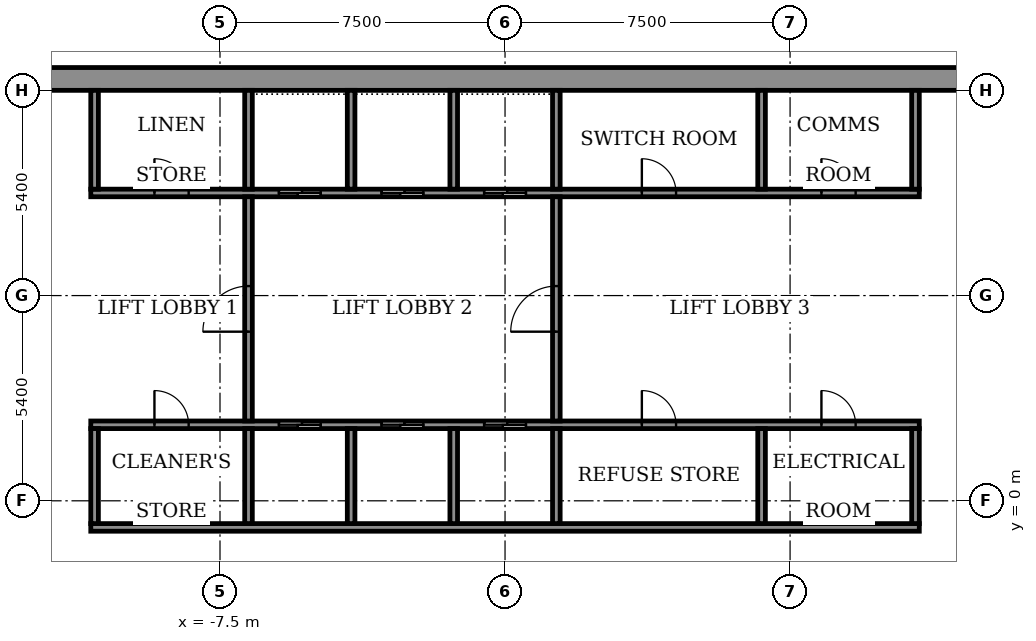
"""IFC4 building model, lengths in metres.
Left out: names, types, materials, properties, quantities, classifications, styles, units other than length and angle.
Written with IfcOpenShell. Run it as: python <this file> out.ifc"""

import sys

from ifc_helpers import new_model, si_unit, direction, frame, frame_2d, origin, place, context, subcontext, project, spatial, rectangle, extrude, element, fill, save


model = new_model("IFC4")
c1 = context("Model", 3, precision=1e-05, world=origin(), true_north=direction((0.0, 1.0)))
c2 = subcontext(c1, "Body", "Model", "MODEL_VIEW")
j1 = project(units=[si_unit("LENGTHUNIT", "METRE"), si_unit("PLANEANGLEUNIT", "RADIAN")], contexts=[c1])
p1 = place(None, origin())
s1 = spatial("IfcSite", under=j1, at=p1, CompositionType="ELEMENT")
p2 = place(p1, origin())
s2 = spatial("IfcBuilding", under=s1, at=p2, CompositionType="ELEMENT")
p3 = place(p2, frame((0.0, 0.0, 313.3)))
s3 = spatial("IfcBuildingStorey", under=s2, at=p3, CompositionType="ELEMENT", Elevation=313.3)
p4 = place(p3, frame((-14.4, 11.1, 0.0), z_axis=(0.0, 0.0, 1.0), x_axis=(1.0, 0.0, 0.0)))
e1 = element("IfcWall", 1, at=p4, inside=s3, PredefinedType="SHEAR", context=c2, shape_type="SweptSolid", body=[
    extrude(rectangle(XDim=28.8, YDim=0.6, at=frame_2d((14.4, 0.0))), origin(), (0.0, 0.0, 1.0), 3.6),
])
p5 = place(p3, frame((-10.9, -0.7, 0.0), z_axis=(0.0, 0.0, 1.0), x_axis=(1.0, 0.0, 0.0)))
e2 = element("IfcWall", 2, at=p5, inside=s3, PredefinedType="SHEAR", context=c2, shape_type="SweptSolid", body=[
    extrude(rectangle(XDim=21.8, YDim=0.2, at=frame_2d((10.9, 0.0))), origin(), (0.0, 0.0, 1.0), 3.05),
])
p6 = place(p3, frame((-10.9, 2.0, 0.0), z_axis=(0.0, 0.0, 1.0), x_axis=(1.0, 0.0, 0.0)))
e3 = element("IfcWall", 3, at=p6, inside=s3, PredefinedType="SHEAR", context=c2, shape_type="SweptSolid", body=[
    extrude(rectangle(XDim=21.8, YDim=0.2, at=frame_2d((10.9, 0.0))), origin(), (0.0, 0.0, 1.0), 3.05),
])
p7 = place(p6, frame((4.95, 0.0, 0.0)))
e4 = element("IfcOpeningElement", 4, at=p7, cuts=e3, PredefinedType="OPENING", context=c2, shape_type="SweptSolid", body=[
    extrude(rectangle(XDim=1.1, YDim=2.1, at=frame_2d((0.55, 1.05))), frame((0.0, 0.11, 0.0), z_axis=(0.0, -1.0, 0.0), x_axis=(1.0, 0.0, 0.0)), (0.0, 0.0, 1.0), 0.22),
])
p8 = place(p6, frame((7.65, 0.0, 0.0)))
e5 = element("IfcOpeningElement", 5, at=p8, cuts=e3, PredefinedType="OPENING", context=c2, shape_type="SweptSolid", body=[
    extrude(rectangle(XDim=1.1, YDim=2.1, at=frame_2d((0.55, 1.05))), frame((0.0, 0.11, 0.0), z_axis=(0.0, -1.0, 0.0), x_axis=(1.0, 0.0, 0.0)), (0.0, 0.0, 1.0), 0.22),
])
p9 = place(p6, frame((10.35, 0.0, 0.0)))
e6 = element("IfcOpeningElement", 6, at=p9, cuts=e3, PredefinedType="OPENING", context=c2, shape_type="SweptSolid", body=[
    extrude(rectangle(XDim=1.1, YDim=2.1, at=frame_2d((0.55, 1.05))), frame((0.0, 0.11, 0.0), z_axis=(0.0, -1.0, 0.0), x_axis=(1.0, 0.0, 0.0)), (0.0, 0.0, 1.0), 0.22),
])
p10 = place(p6, frame((1.675, 0.0, 0.0)))
e7 = element("IfcOpeningElement", 7, at=p10, cuts=e3, PredefinedType="OPENING", context=c2, shape_type="SweptSolid", body=[
    extrude(rectangle(XDim=0.9, YDim=2.1, at=frame_2d((0.45, 1.05))), frame((0.0, 0.11, 0.0), z_axis=(0.0, -1.0, 0.0), x_axis=(1.0, 0.0, 0.0)), (0.0, 0.0, 1.0), 0.22),
])
p11 = place(p6, frame((14.5, 0.0, 0.0)))
e8 = element("IfcOpeningElement", 8, at=p11, cuts=e3, PredefinedType="OPENING", context=c2, shape_type="SweptSolid", body=[
    extrude(rectangle(XDim=0.9, YDim=2.1, at=frame_2d((0.45, 1.05))), frame((0.0, 0.11, 0.0), z_axis=(0.0, -1.0, 0.0), x_axis=(1.0, 0.0, 0.0)), (0.0, 0.0, 1.0), 0.22),
])
p12 = place(p6, frame((19.225, 0.0, 0.0)))
e9 = element("IfcOpeningElement", 9, at=p12, cuts=e3, PredefinedType="OPENING", context=c2, shape_type="SweptSolid", body=[
    extrude(rectangle(XDim=0.9, YDim=2.1, at=frame_2d((0.45, 1.05))), frame((0.0, 0.11, 0.0), z_axis=(0.0, -1.0, 0.0), x_axis=(1.0, 0.0, 0.0)), (0.0, 0.0, 1.0), 0.22),
])
p13 = place(p3, frame((-10.9, 8.1, 0.0), z_axis=(0.0, 0.0, 1.0), x_axis=(1.0, 0.0, 0.0)))
e10 = element("IfcWall", 10, at=p13, inside=s3, PredefinedType="SHEAR", context=c2, shape_type="SweptSolid", body=[
    extrude(rectangle(XDim=21.8, YDim=0.2, at=frame_2d((10.9, 0.0))), origin(), (0.0, 0.0, 1.0), 3.05),
])
p14 = place(p13, frame((4.95, 0.0, 0.0)))
e11 = element("IfcOpeningElement", 11, at=p14, cuts=e10, PredefinedType="OPENING", context=c2, shape_type="SweptSolid", body=[
    extrude(rectangle(XDim=1.1, YDim=2.1, at=frame_2d((0.55, 1.05))), frame((0.0, 0.11, 0.0), z_axis=(0.0, -1.0, 0.0), x_axis=(1.0, 0.0, 0.0)), (0.0, 0.0, 1.0), 0.22),
])
p15 = place(p13, frame((7.65, 0.0, 0.0)))
e12 = element("IfcOpeningElement", 12, at=p15, cuts=e10, PredefinedType="OPENING", context=c2, shape_type="SweptSolid", body=[
    extrude(rectangle(XDim=1.1, YDim=2.1, at=frame_2d((0.55, 1.05))), frame((0.0, 0.11, 0.0), z_axis=(0.0, -1.0, 0.0), x_axis=(1.0, 0.0, 0.0)), (0.0, 0.0, 1.0), 0.22),
])
p16 = place(p13, frame((10.35, 0.0, 0.0)))
e13 = element("IfcOpeningElement", 13, at=p16, cuts=e10, PredefinedType="OPENING", context=c2, shape_type="SweptSolid", body=[
    extrude(rectangle(XDim=1.1, YDim=2.1, at=frame_2d((0.55, 1.05))), frame((0.0, 0.11, 0.0), z_axis=(0.0, -1.0, 0.0), x_axis=(1.0, 0.0, 0.0)), (0.0, 0.0, 1.0), 0.22),
])
p17 = place(p13, frame((1.675, 0.0, 0.0)))
e14 = element("IfcOpeningElement", 14, at=p17, cuts=e10, PredefinedType="OPENING", context=c2, shape_type="SweptSolid", body=[
    extrude(rectangle(XDim=0.9, YDim=2.1, at=frame_2d((0.45, 1.05))), frame((0.0, 0.11, 0.0), z_axis=(0.0, -1.0, 0.0), x_axis=(1.0, 0.0, 0.0)), (0.0, 0.0, 1.0), 0.22),
])
p18 = place(p13, frame((14.5, 0.0, 0.0)))
e15 = element("IfcOpeningElement", 15, at=p18, cuts=e10, PredefinedType="OPENING", context=c2, shape_type="SweptSolid", body=[
    extrude(rectangle(XDim=0.9, YDim=2.1, at=frame_2d((0.45, 1.05))), frame((0.0, 0.11, 0.0), z_axis=(0.0, -1.0, 0.0), x_axis=(1.0, 0.0, 0.0)), (0.0, 0.0, 1.0), 0.22),
])
p19 = place(p13, frame((19.225, 0.0, 0.0)))
e16 = element("IfcOpeningElement", 16, at=p19, cuts=e10, PredefinedType="OPENING", context=c2, shape_type="SweptSolid", body=[
    extrude(rectangle(XDim=0.9, YDim=2.1, at=frame_2d((0.45, 1.05))), frame((0.0, 0.11, 0.0), z_axis=(0.0, -1.0, 0.0), x_axis=(1.0, 0.0, 0.0)), (0.0, 0.0, 1.0), 0.22),
])
p20 = place(p3, frame((-10.8, -0.6, 0.0), z_axis=(0.0, 0.0, 1.0), x_axis=(0.0, 1.0, 0.0)))
e17 = element("IfcWall", 17, at=p20, inside=s3, PredefinedType="STANDARD", context=c2, shape_type="SweptSolid", body=[
    extrude(rectangle(XDim=2.5, YDim=0.2, at=frame_2d((1.25, 0.0))), origin(), (0.0, 0.0, 1.0), 3.05),
])
for number, where, z_axis, x_axis in (
    (18, (-6.75, -0.6, 0.0), (0.0, 0.0, 1.0), (0.0, 1.0, 0.0)),
    (19, (-4.05, -0.6, 0.0), (0.0, 0.0, 1.0), (0.0, 1.0, 0.0)),
    (20, (-1.35, -0.6, 0.0), (0.0, 0.0, 1.0), (0.0, 1.0, 0.0)),
    (21, (1.35, -0.6, 0.0), (0.0, 0.0, 1.0), (0.0, 1.0, 0.0)),
):
    element("IfcWall", number, at=place(p3, frame(where, z_axis=z_axis, x_axis=x_axis)), inside=s3, PredefinedType="SHEAR", context=c2, shape_type="SweptSolid", body=[
        extrude(rectangle(XDim=2.5, YDim=0.2, at=frame_2d((1.25, 0.0))), origin(), (0.0, 0.0, 1.0), 3.05),
    ])
for number, where, z_axis, x_axis in (
    (22, (6.75, -0.6, 0.0), (0.0, 0.0, 1.0), (0.0, 1.0, 0.0)),
    (23, (10.8, -0.6, 0.0), (0.0, 0.0, 1.0), (0.0, 1.0, 0.0)),
):
    element("IfcWall", number, at=place(p3, frame(where, z_axis=z_axis, x_axis=x_axis)), inside=s3, PredefinedType="STANDARD", context=c2, shape_type="SweptSolid", body=[
        extrude(rectangle(XDim=2.5, YDim=0.2, at=frame_2d((1.25, 0.0))), origin(), (0.0, 0.0, 1.0), 3.05),
    ])
p21 = place(p3, frame((-10.8, 8.2, 0.0), z_axis=(0.0, 0.0, 1.0), x_axis=(0.0, 1.0, 0.0)))
e24 = element("IfcWall", 24, at=p21, inside=s3, PredefinedType="STANDARD", context=c2, shape_type="SweptSolid", body=[
    extrude(rectangle(XDim=2.6, YDim=0.2, at=frame_2d((1.3, 0.0))), origin(), (0.0, 0.0, 1.0), 3.05),
])
for number, where, z_axis, x_axis in (
    (25, (-6.75, 8.2, 0.0), (0.0, 0.0, 1.0), (0.0, 1.0, 0.0)),
    (26, (-4.05, 8.2, 0.0), (0.0, 0.0, 1.0), (0.0, 1.0, 0.0)),
    (27, (-1.35, 8.2, 0.0), (0.0, 0.0, 1.0), (0.0, 1.0, 0.0)),
    (28, (1.35, 8.2, 0.0), (0.0, 0.0, 1.0), (0.0, 1.0, 0.0)),
):
    element("IfcWall", number, at=place(p3, frame(where, z_axis=z_axis, x_axis=x_axis)), inside=s3, PredefinedType="SHEAR", context=c2, shape_type="SweptSolid", body=[
        extrude(rectangle(XDim=2.6, YDim=0.2, at=frame_2d((1.3, 0.0))), origin(), (0.0, 0.0, 1.0), 3.05),
    ])
for number, where, z_axis, x_axis in (
    (29, (6.75, 8.2, 0.0), (0.0, 0.0, 1.0), (0.0, 1.0, 0.0)),
    (30, (10.8, 8.2, 0.0), (0.0, 0.0, 1.0), (0.0, 1.0, 0.0)),
):
    element("IfcWall", number, at=place(p3, frame(where, z_axis=z_axis, x_axis=x_axis)), inside=s3, PredefinedType="STANDARD", context=c2, shape_type="SweptSolid", body=[
        extrude(rectangle(XDim=2.6, YDim=0.2, at=frame_2d((1.3, 0.0))), origin(), (0.0, 0.0, 1.0), 3.05),
    ])
p22 = place(p3, frame((-6.75, 2.1, 0.0), z_axis=(0.0, 0.0, 1.0), x_axis=(0.0, 1.0, 0.0)))
e31 = element("IfcWall", 31, at=p22, inside=s3, PredefinedType="STANDARD", context=c2, shape_type="SweptSolid", body=[
    extrude(rectangle(XDim=5.9, YDim=0.2, at=frame_2d((2.95, 0.0))), origin(), (0.0, 0.0, 1.0), 3.05),
])
p23 = place(p22, frame((2.35, 0.0, 0.0)))
e32 = element("IfcOpeningElement", 32, at=p23, cuts=e31, PredefinedType="OPENING", context=c2, shape_type="SweptSolid", body=[
    extrude(rectangle(XDim=1.2, YDim=2.1, at=frame_2d((0.6, 1.05))), frame((0.0, 0.11, 0.0), z_axis=(0.0, -1.0, 0.0), x_axis=(1.0, 0.0, 0.0)), (0.0, 0.0, 1.0), 0.22),
])
p24 = place(p3, frame((1.35, 2.1, 0.0), z_axis=(0.0, 0.0, 1.0), x_axis=(0.0, 1.0, 0.0)))
e33 = element("IfcWall", 33, at=p24, inside=s3, PredefinedType="STANDARD", context=c2, shape_type="SweptSolid", body=[
    extrude(rectangle(XDim=5.9, YDim=0.2, at=frame_2d((2.95, 0.0))), origin(), (0.0, 0.0, 1.0), 3.05),
])
p25 = place(p24, frame((2.35, 0.0, 0.0)))
e34 = element("IfcOpeningElement", 34, at=p25, cuts=e33, PredefinedType="OPENING", context=c2, shape_type="SweptSolid", body=[
    extrude(rectangle(XDim=1.2, YDim=2.1, at=frame_2d((0.6, 1.05))), frame((0.0, 0.11, 0.0), z_axis=(0.0, -1.0, 0.0), x_axis=(1.0, 0.0, 0.0)), (0.0, 0.0, 1.0), 0.22),
])
p26 = place(p7, origin())
e35 = element("IfcDoor", 35, at=p26, inside=s3, OperationType="SLIDING_TO_LEFT", PredefinedType="DOOR", context=c2, shape_type="SweptSolid", body=[
    extrude(rectangle(XDim=1.1, YDim=2.1, at=frame_2d((0.55, 1.05))), frame((0.0, 0.025, 0.0), z_axis=(0.0, -1.0, 0.0), x_axis=(1.0, 0.0, 0.0)), (0.0, 0.0, 1.0), 0.05),
])
fill(e4, e35)
p27 = place(p8, origin())
e36 = element("IfcDoor", 36, at=p27, inside=s3, OperationType="SLIDING_TO_LEFT", PredefinedType="DOOR", context=c2, shape_type="SweptSolid", body=[
    extrude(rectangle(XDim=1.1, YDim=2.1, at=frame_2d((0.55, 1.05))), frame((0.0, 0.025, 0.0), z_axis=(0.0, -1.0, 0.0), x_axis=(1.0, 0.0, 0.0)), (0.0, 0.0, 1.0), 0.05),
])
fill(e5, e36)
p28 = place(p9, origin())
e37 = element("IfcDoor", 37, at=p28, inside=s3, OperationType="SLIDING_TO_LEFT", PredefinedType="DOOR", context=c2, shape_type="SweptSolid", body=[
    extrude(rectangle(XDim=1.1, YDim=2.1, at=frame_2d((0.55, 1.05))), frame((0.0, 0.025, 0.0), z_axis=(0.0, -1.0, 0.0), x_axis=(1.0, 0.0, 0.0)), (0.0, 0.0, 1.0), 0.05),
])
fill(e6, e37)
p29 = place(p14, origin())
e38 = element("IfcDoor", 38, at=p29, inside=s3, OperationType="SLIDING_TO_LEFT", PredefinedType="DOOR", context=c2, shape_type="SweptSolid", body=[
    extrude(rectangle(XDim=1.1, YDim=2.1, at=frame_2d((0.55, 1.05))), frame((0.0, 0.025, 0.0), z_axis=(0.0, -1.0, 0.0), x_axis=(1.0, 0.0, 0.0)), (0.0, 0.0, 1.0), 0.05),
])
fill(e11, e38)
p30 = place(p15, origin())
e39 = element("IfcDoor", 39, at=p30, inside=s3, OperationType="SLIDING_TO_LEFT", PredefinedType="DOOR", context=c2, shape_type="SweptSolid", body=[
    extrude(rectangle(XDim=1.1, YDim=2.1, at=frame_2d((0.55, 1.05))), frame((0.0, 0.025, 0.0), z_axis=(0.0, -1.0, 0.0), x_axis=(1.0, 0.0, 0.0)), (0.0, 0.0, 1.0), 0.05),
])
fill(e12, e39)
p31 = place(p16, origin())
e40 = element("IfcDoor", 40, at=p31, inside=s3, OperationType="SLIDING_TO_LEFT", PredefinedType="DOOR", context=c2, shape_type="SweptSolid", body=[
    extrude(rectangle(XDim=1.1, YDim=2.1, at=frame_2d((0.55, 1.05))), frame((0.0, 0.025, 0.0), z_axis=(0.0, -1.0, 0.0), x_axis=(1.0, 0.0, 0.0)), (0.0, 0.0, 1.0), 0.05),
])
fill(e13, e40)
p32 = place(p10, origin())
e41 = element("IfcDoor", 41, at=p32, inside=s3, OperationType="SINGLE_SWING_RIGHT", PredefinedType="DOOR", context=c2, shape_type="SweptSolid", body=[
    extrude(rectangle(XDim=0.9, YDim=2.1, at=frame_2d((0.45, 1.05))), frame((0.0, 0.025, 0.0), z_axis=(0.0, -1.0, 0.0), x_axis=(1.0, 0.0, 0.0)), (0.0, 0.0, 1.0), 0.05),
])
fill(e7, e41)
p33 = place(p11, origin())
e42 = element("IfcDoor", 42, at=p33, inside=s3, OperationType="SINGLE_SWING_RIGHT", PredefinedType="DOOR", context=c2, shape_type="SweptSolid", body=[
    extrude(rectangle(XDim=0.9, YDim=2.1, at=frame_2d((0.45, 1.05))), frame((0.0, 0.025, 0.0), z_axis=(0.0, -1.0, 0.0), x_axis=(1.0, 0.0, 0.0)), (0.0, 0.0, 1.0), 0.05),
])
fill(e8, e42)
p34 = place(p12, origin())
e43 = element("IfcDoor", 43, at=p34, inside=s3, OperationType="SINGLE_SWING_LEFT", PredefinedType="DOOR", context=c2, shape_type="SweptSolid", body=[
    extrude(rectangle(XDim=0.9, YDim=2.1, at=frame_2d((0.45, 1.05))), frame((0.0, 0.025, 0.0), z_axis=(0.0, -1.0, 0.0), x_axis=(1.0, 0.0, 0.0)), (0.0, 0.0, 1.0), 0.05),
])
fill(e9, e43)
p35 = place(p17, origin())
e44 = element("IfcDoor", 44, at=p35, inside=s3, OperationType="SINGLE_SWING_RIGHT", PredefinedType="DOOR", context=c2, shape_type="SweptSolid", body=[
    extrude(rectangle(XDim=0.9, YDim=2.1, at=frame_2d((0.45, 1.05))), frame((0.0, 0.025, 0.0), z_axis=(0.0, -1.0, 0.0), x_axis=(1.0, 0.0, 0.0)), (0.0, 0.0, 1.0), 0.05),
])
fill(e14, e44)
p36 = place(p18, origin())
e45 = element("IfcDoor", 45, at=p36, inside=s3, OperationType="SINGLE_SWING_LEFT", PredefinedType="DOOR", context=c2, shape_type="SweptSolid", body=[
    extrude(rectangle(XDim=0.9, YDim=2.1, at=frame_2d((0.45, 1.05))), frame((0.0, 0.025, 0.0), z_axis=(0.0, -1.0, 0.0), x_axis=(1.0, 0.0, 0.0)), (0.0, 0.0, 1.0), 0.05),
])
fill(e15, e45)
p37 = place(p19, origin())
e46 = element("IfcDoor", 46, at=p37, inside=s3, OperationType="SINGLE_SWING_LEFT", PredefinedType="DOOR", context=c2, shape_type="SweptSolid", body=[
    extrude(rectangle(XDim=0.9, YDim=2.1, at=frame_2d((0.45, 1.05))), frame((0.0, 0.025, 0.0), z_axis=(0.0, -1.0, 0.0), x_axis=(1.0, 0.0, 0.0)), (0.0, 0.0, 1.0), 0.05),
])
fill(e16, e46)
p38 = place(p23, origin())
e47 = element("IfcDoor", 47, at=p38, inside=s3, OperationType="SINGLE_SWING_LEFT", PredefinedType="DOOR", context=c2, shape_type="SweptSolid", body=[
    extrude(rectangle(XDim=1.2, YDim=2.1, at=frame_2d((0.6, 1.05))), frame((0.0, 0.025, 0.0), z_axis=(0.0, -1.0, 0.0), x_axis=(1.0, 0.0, 0.0)), (0.0, 0.0, 1.0), 0.05),
])
fill(e32, e47)
p39 = place(p25, origin())
e48 = element("IfcDoor", 48, at=p39, inside=s3, OperationType="SINGLE_SWING_LEFT", PredefinedType="DOOR", context=c2, shape_type="SweptSolid", body=[
    extrude(rectangle(XDim=1.2, YDim=2.1, at=frame_2d((0.6, 1.05))), frame((0.0, 0.025, 0.0), z_axis=(0.0, -1.0, 0.0), x_axis=(1.0, 0.0, 0.0)), (0.0, 0.0, 1.0), 0.05),
])
fill(e34, e48)
save(model, sys.argv[1])
